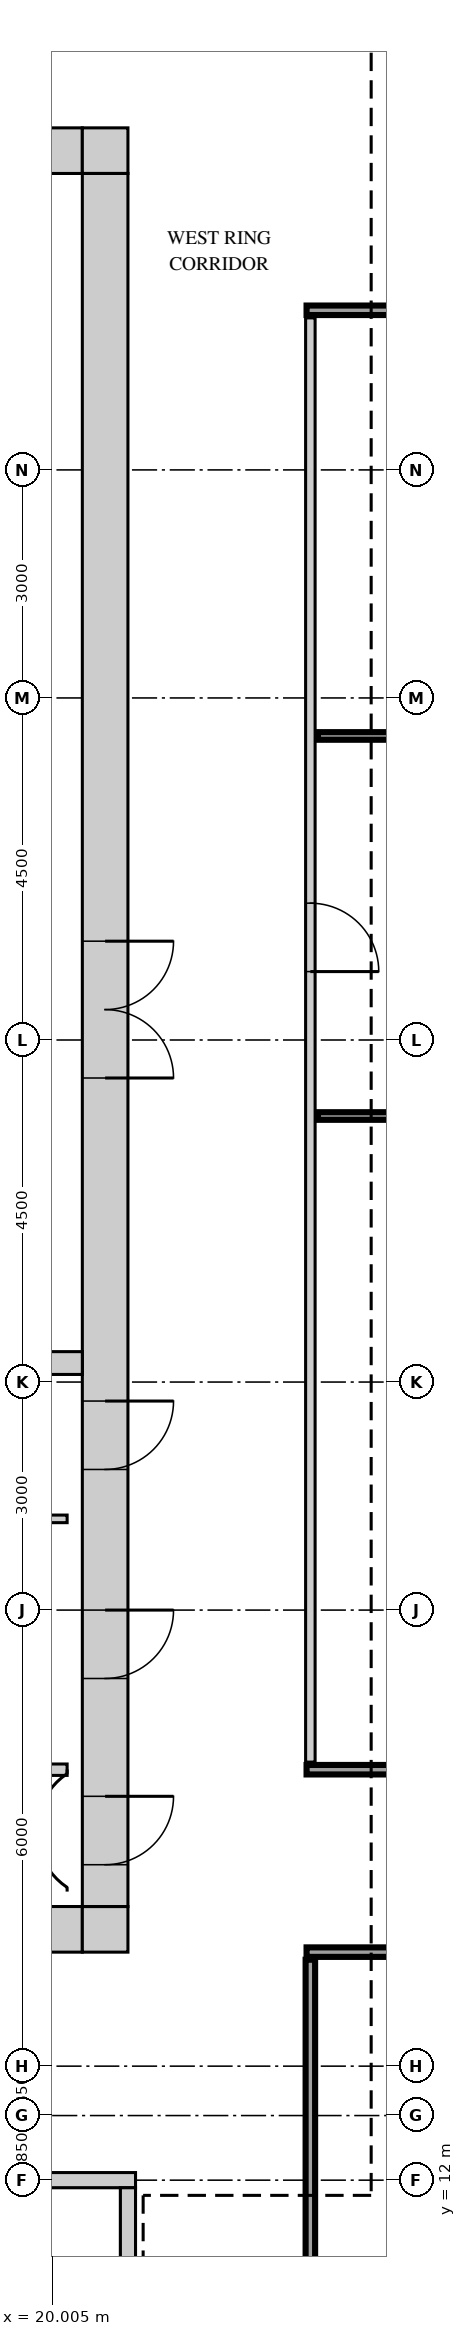
"""IFC4 building model, lengths in metres.
Left out: names, types, materials, properties, quantities, classifications, styles, units other than length and angle.
Written with IfcOpenShell. Run it as: python <this file> out.ifc"""

import sys

from ifc_helpers import new_model, si_unit, direction, frame, frame_2d, origin, place, context, subcontext, project, spatial, rectangle, extrude, source, transform, mapped, element, fill, save


model = new_model("IFC4")
c1 = context("Model", 3, precision=1e-05, world=origin(), true_north=direction((0.0, 1.0)))
c2 = subcontext(c1, "Body", "Model", "MODEL_VIEW")
j1 = project(units=[si_unit("LENGTHUNIT", "METRE"), si_unit("PLANEANGLEUNIT", "RADIAN")], contexts=[c1])
p1 = place(None, origin())
s1 = spatial("IfcSite", under=j1, at=p1, CompositionType="ELEMENT")
p2 = place(p1, origin())
s2 = spatial("IfcBuilding", under=s1, at=p2, CompositionType="ELEMENT")
p3 = place(p2, frame((0.0, 0.0, 306.2)))
s3 = spatial("IfcBuildingStorey", under=s2, at=p3, CompositionType="ELEMENT", Elevation=306.2)
m1 = source(origin(), c2, "Body", "SweptSolid", [
    extrude(rectangle(XDim=14.4, YDim=0.6, at=frame_2d((7.2, 0.0))), origin(), (0.0, 0.0, 1.0), 3.75),
])
p4 = place(p3, frame((6.0, 38.7, 0.0), z_axis=(0.0, 0.0, 1.0), x_axis=(1.0, 0.0, 0.0)))
e1 = element("IfcWall", 1, at=p4, inside=s3, PredefinedType="SHEAR", context=c2, shape_type="MappedRepresentation", body=[
    mapped(m1, transform((0.0, 0.0, 0.0))),
])
m2 = source(origin(), c2, "Body", "SweptSolid", [
    extrude(rectangle(XDim=0.9, YDim=2.1, at=frame_2d((0.45, 1.05))), frame((0.0, 0.31, 0.0), z_axis=(0.0, -1.0, 0.0), x_axis=(1.0, 0.0, 0.0)), (0.0, 0.0, 1.0), 0.62),
])
p5 = place(p4, frame((3.7, 0.0, 0.0)))
e2 = element("IfcOpeningElement", 2, at=p5, cuts=e1, PredefinedType="OPENING", context=c2, shape_type="MappedRepresentation", body=[
    mapped(m2, transform((0.0, 0.0, 0.0))),
])
p6 = place(p4, frame((10.4, 0.0, 0.0)))
e3 = element("IfcOpeningElement", 3, at=p6, cuts=e1, PredefinedType="OPENING", context=c2, shape_type="MappedRepresentation", body=[
    mapped(m2, transform((0.0, 0.0, 0.0))),
])
m3 = source(origin(), c2, "Body", "SweptSolid", [
    extrude(rectangle(XDim=0.6, YDim=0.6, at=frame_2d((0.3, 0.0))), origin(), (0.0, 0.0, 1.0), 3.75),
])
p7 = place(p3, frame((20.4, 38.7, 0.0), z_axis=(0.0, 0.0, 1.0), x_axis=(1.0, 0.0, 0.0)))
e4 = element("IfcWall", 4, at=p7, inside=s3, PredefinedType="SHEAR", context=c2, shape_type="MappedRepresentation", body=[
    mapped(m3, transform((0.0, 0.0, 0.0))),
])
p8 = place(p3, frame((6.0, 15.3, 0.0), z_axis=(0.0, 0.0, 1.0), x_axis=(1.0, 0.0, 0.0)))
e5 = element("IfcWall", 5, at=p8, inside=s3, PredefinedType="SHEAR", context=c2, shape_type="MappedRepresentation", body=[
    mapped(m1, transform((0.0, 0.0, 0.0))),
])
m4 = source(origin(), c2, "Body", "SweptSolid", [
    extrude(rectangle(XDim=1.2, YDim=2.1, at=frame_2d((0.6, 1.05))), frame((0.0, 0.31, 0.0), z_axis=(0.0, -1.0, 0.0), x_axis=(1.0, 0.0, 0.0)), (0.0, 0.0, 1.0), 0.62),
])
p9 = place(p8, frame((6.2, 0.0, 0.0)))
e6 = element("IfcOpeningElement", 6, at=p9, cuts=e5, PredefinedType="OPENING", context=c2, shape_type="MappedRepresentation", body=[
    mapped(m4, transform((0.0, 0.0, 0.0))),
])
p10 = place(p8, frame((2.85, 0.0, 0.0)))
e7 = element("IfcOpeningElement", 7, at=p10, cuts=e5, PredefinedType="OPENING", context=c2, shape_type="MappedRepresentation", body=[
    mapped(m4, transform((0.0, 0.0, 0.0))),
])
m5 = source(origin(), c2, "Body", "SweptSolid", [
    extrude(rectangle(XDim=1.0, YDim=2.1, at=frame_2d((0.5, 1.05))), frame((0.0, 0.31, 0.0), z_axis=(0.0, -1.0, 0.0), x_axis=(1.0, 0.0, 0.0)), (0.0, 0.0, 1.0), 0.62),
])
p11 = place(p8, frame((8.7, 0.0, 0.0)))
e8 = element("IfcOpeningElement", 8, at=p11, cuts=e5, PredefinedType="OPENING", context=c2, shape_type="MappedRepresentation", body=[
    mapped(m5, transform((0.0, 0.0, 0.0))),
])
p12 = place(p3, frame((20.4, 15.3, 0.0), z_axis=(0.0, 0.0, 1.0), x_axis=(1.0, 0.0, 0.0)))
e9 = element("IfcWall", 9, at=p12, inside=s3, PredefinedType="SHEAR", context=c2, shape_type="MappedRepresentation", body=[
    mapped(m3, transform((0.0, 0.0, 0.0))),
])
m6 = source(origin(), c2, "Body", "SweptSolid", [
    extrude(rectangle(XDim=22.8, YDim=0.6, at=frame_2d((11.4, 0.0))), origin(), (0.0, 0.0, 1.0), 3.75),
])
p13 = place(p3, frame((20.7, 15.6, 0.0), z_axis=(0.0, 0.0, 1.0), x_axis=(0.0, 1.0, 0.0)))
e10 = element("IfcWall", 10, at=p13, inside=s3, PredefinedType="SHEAR", context=c2, shape_type="MappedRepresentation", body=[
    mapped(m6, transform((0.0, 0.0, 0.0))),
])
m7 = source(origin(), c2, "Body", "SweptSolid", [
    extrude(rectangle(XDim=1.8, YDim=2.1, at=frame_2d((0.9, 1.05))), frame((0.0, 0.31, 0.0), z_axis=(0.0, -1.0, 0.0), x_axis=(1.0, 0.0, 0.0)), (0.0, 0.0, 1.0), 0.62),
])
p14 = place(p13, frame((10.9, 0.0, 0.0)))
e11 = element("IfcOpeningElement", 11, at=p14, cuts=e10, PredefinedType="OPENING", context=c2, shape_type="MappedRepresentation", body=[
    mapped(m7, transform((0.0, 0.0, 0.0))),
])
p15 = place(p13, frame((0.55, 0.0, 0.0)))
e12 = element("IfcOpeningElement", 12, at=p15, cuts=e10, PredefinedType="OPENING", context=c2, shape_type="MappedRepresentation", body=[
    mapped(m2, transform((0.0, 0.0, 0.0))),
])
p16 = place(p13, frame((3.0, 0.0, 0.0)))
e13 = element("IfcOpeningElement", 13, at=p16, cuts=e10, PredefinedType="OPENING", context=c2, shape_type="MappedRepresentation", body=[
    mapped(m2, transform((0.0, 0.0, 0.0))),
])
p17 = place(p13, frame((5.75, 0.0, 0.0)))
e14 = element("IfcOpeningElement", 14, at=p17, cuts=e10, PredefinedType="OPENING", context=c2, shape_type="MappedRepresentation", body=[
    mapped(m2, transform((0.0, 0.0, 0.0))),
])
m8 = source(origin(), c2, "Body", "SweptSolid", [
    extrude(rectangle(XDim=7.2, YDim=0.2, at=frame_2d((3.6, 0.0))), origin(), (0.0, 0.0, 1.0), 3.75),
])
p18 = place(p3, frame((13.9, 12.0, 0.0), z_axis=(0.0, 0.0, 1.0), x_axis=(1.0, 0.0, 0.0)))
e15 = element("IfcWall", 15, at=p18, inside=s3, PredefinedType="SHEAR", context=c2, shape_type="MappedRepresentation", body=[
    mapped(m8, transform((0.0, 0.0, 0.0))),
])
m9 = source(origin(), c2, "Body", "SweptSolid", [
    extrude(rectangle(XDim=3.35, YDim=0.2, at=frame_2d((1.675, 0.0))), origin(), (0.0, 0.0, 1.0), 3.75),
])
p19 = place(p3, frame((21.0, 8.55, 0.0), z_axis=(0.0, 0.0, 1.0), x_axis=(0.0, 1.0, 0.0)))
e16 = element("IfcWall", 16, at=p19, inside=s3, PredefinedType="SHEAR", context=c2, shape_type="MappedRepresentation", body=[
    mapped(m9, transform((0.0, 0.0, 0.0))),
])
m10 = source(origin(), c2, "Body", "SweptSolid", [
    extrude(rectangle(XDim=13.2, YDim=0.3, at=frame_2d((6.6, 0.0))), origin(), (0.0, 0.0, 1.0), 3.75),
])
p20 = place(p3, frame((7.2, 22.75, 0.0), z_axis=(0.0, 0.0, 1.0), x_axis=(1.0, 0.0, 0.0)))
e17 = element("IfcWall", 17, at=p20, inside=s3, PredefinedType="STANDARD", context=c2, shape_type="MappedRepresentation", body=[
    mapped(m10, transform((0.0, 0.0, 0.0))),
])
m11 = source(origin(), c2, "Body", "SweptSolid", [
    extrude(rectangle(XDim=8.75, YDim=0.125, at=frame_2d((4.375, 0.0))), origin(), (0.0, 0.0, 1.0), 3.8),
])
p21 = place(p3, frame((23.4, 6.15, 0.0), z_axis=(0.0, 0.0, 1.0), x_axis=(0.0, 1.0, 0.0)))
e18 = element("IfcWall", 18, at=p21, inside=s3, PredefinedType="PARTITIONING", context=c2, shape_type="MappedRepresentation", body=[
    mapped(m11, transform((0.0, 0.0, 0.0))),
])
m12 = source(origin(), c2, "Body", "SweptSolid", [
    extrude(rectangle(XDim=19.1, YDim=0.125, at=frame_2d((9.55, 0.0))), origin(), (0.0, 0.0, 1.0), 3.8),
])
p22 = place(p3, frame((23.35, 15.0, 0.0), z_axis=(0.0, 0.0, 1.0), x_axis=(1.0, 0.0, 0.0)))
e19 = element("IfcWall", 19, at=p22, inside=s3, PredefinedType="PARTITIONING", context=c2, shape_type="MappedRepresentation", body=[
    mapped(m12, transform((0.0, 0.0, 0.0))),
])
m13 = source(origin(), c2, "Body", "SweptSolid", [
    extrude(rectangle(XDim=1.2, YDim=2.1, at=frame_2d((0.6, 1.05))), frame((0.0, 0.073, 0.0), z_axis=(0.0, -1.0, 0.0), x_axis=(1.0, 0.0, 0.0)), (0.0, 0.0, 1.0), 0.145),
])
p23 = place(p22, frame((7.75, 0.0, 0.0)))
e20 = element("IfcOpeningElement", 20, at=p23, cuts=e19, PredefinedType="OPENING", context=c2, shape_type="MappedRepresentation", body=[
    mapped(m13, transform((0.0, 0.0, 0.0))),
])
m14 = source(origin(), c2, "Body", "SweptSolid", [
    extrude(rectangle(XDim=4.0, YDim=0.15, at=frame_2d((2.0, 0.0))), origin(), (0.0, 0.0, 1.0), 3.8),
])
p24 = place(p3, frame((16.2, 17.4, 0.0), z_axis=(0.0, 0.0, 1.0), x_axis=(1.0, 0.0, 0.0)))
e21 = element("IfcWall", 21, at=p24, inside=s3, PredefinedType="PARTITIONING", context=c2, shape_type="MappedRepresentation", body=[
    mapped(m14, transform((0.0, 0.0, 0.0))),
])
m15 = source(origin(), c2, "Body", "SweptSolid", [
    extrude(rectangle(XDim=16.7, YDim=0.125, at=frame_2d((8.35, 0.0))), origin(), (0.0, 0.0, 1.0), 3.8),
])
p25 = place(p3, frame((23.35, 17.4, 0.0), z_axis=(0.0, 0.0, 1.0), x_axis=(1.0, 0.0, 0.0)))
e22 = element("IfcWall", 22, at=p25, inside=s3, PredefinedType="PARTITIONING", context=c2, shape_type="MappedRepresentation", body=[
    mapped(m15, transform((0.0, 0.0, 0.0))),
])
p26 = place(p25, frame((7.75, 0.0, 0.0)))
e23 = element("IfcOpeningElement", 23, at=p26, cuts=e22, PredefinedType="OPENING", context=c2, shape_type="MappedRepresentation", body=[
    mapped(m13, transform((0.0, 0.0, 0.0))),
])
m16 = source(origin(), c2, "Body", "SweptSolid", [
    extrude(rectangle(XDim=19.0, YDim=0.125, at=frame_2d((9.5, 0.0))), origin(), (0.0, 0.0, 1.0), 3.8),
])
p27 = place(p3, frame((23.4, 17.5, 0.0), z_axis=(0.0, 0.0, 1.0), x_axis=(0.0, 1.0, 0.0)))
e24 = element("IfcWall", 24, at=p27, inside=s3, PredefinedType="PARTITIONING", context=c2, shape_type="MappedRepresentation", body=[
    mapped(m16, transform((0.0, 0.0, 0.0))),
])
m17 = source(origin(), c2, "Body", "SweptSolid", [
    extrude(rectangle(XDim=0.9, YDim=2.1, at=frame_2d((0.45, 1.05))), frame((0.0, 0.073, 0.0), z_axis=(0.0, -1.0, 0.0), x_axis=(1.0, 0.0, 0.0)), (0.0, 0.0, 1.0), 0.145),
])
p28 = place(p27, frame((10.4, 0.0, 0.0)))
e25 = element("IfcOpeningElement", 25, at=p28, cuts=e24, PredefinedType="OPENING", context=c2, shape_type="MappedRepresentation", body=[
    mapped(m17, transform((0.0, 0.0, 0.0))),
])
m18 = source(origin(), c2, "Body", "SweptSolid", [
    extrude(rectangle(XDim=4.1, YDim=0.1, at=frame_2d((2.05, 0.0))), origin(), (0.0, 0.0, 1.0), 3.8),
])
p29 = place(p3, frame((16.1, 20.7, 0.0), z_axis=(0.0, 0.0, 1.0), x_axis=(1.0, 0.0, 0.0)))
e26 = element("IfcWall", 26, at=p29, inside=s3, PredefinedType="PARTITIONING", context=c2, shape_type="MappedRepresentation", body=[
    mapped(m18, transform((0.0, 0.0, 0.0))),
])
m19 = source(origin(), c2, "Body", "SweptSolid", [
    extrude(rectangle(XDim=16.4, YDim=0.1, at=frame_2d((8.2, 0.0))), origin(), (0.0, 0.0, 1.0), 3.8),
])
for number, where, z_axis, x_axis in (
    (27, (23.5, 26.0, 0.0), (0.0, 0.0, 1.0), (1.0, 0.0, 0.0)),
    (28, (23.5, 31.0, 0.0), (0.0, 0.0, 1.0), (1.0, 0.0, 0.0)),
):
    element("IfcWall", number, at=place(p3, frame(where, z_axis=z_axis, x_axis=x_axis)), inside=s3, PredefinedType="PARTITIONING", context=c2, shape_type="MappedRepresentation", body=[
        mapped(m19, transform((0.0, 0.0, 0.0))),
    ])
p30 = place(p3, frame((23.35, 36.6, 0.0), z_axis=(0.0, 0.0, 1.0), x_axis=(1.0, 0.0, 0.0)))
e29 = element("IfcWall", 29, at=p30, inside=s3, PredefinedType="PARTITIONING", context=c2, shape_type="MappedRepresentation", body=[
    mapped(m15, transform((0.0, 0.0, 0.0))),
])
p31 = place(p30, frame((8.05, 0.0, 0.0)))
e30 = element("IfcOpeningElement", 30, at=p31, cuts=e29, PredefinedType="OPENING", context=c2, shape_type="MappedRepresentation", body=[
    mapped(m17, transform((0.0, 0.0, 0.0))),
])
m20 = source(origin(), c2, "Body", "SweptSolid", [
    extrude(rectangle(XDim=1.8, YDim=2.1, at=frame_2d((0.9, 1.05))), frame((0.0, 0.25, 0.0), z_axis=(0.0, -1.0, 0.0), x_axis=(1.0, 0.0, 0.0)), (0.0, 0.0, 1.0), 0.5),
])
p32 = place(p14, origin())
e31 = element("IfcDoor", 31, at=p32, inside=s3, OperationType="DOUBLE_DOOR_SINGLE_SWING", PredefinedType="DOOR", context=c2, shape_type="MappedRepresentation", body=[
    mapped(m20, transform((0.0, 0.0, 0.0))),
])
fill(e11, e31)
m21 = source(origin(), c2, "Body", "SweptSolid", [
    extrude(rectangle(XDim=0.9, YDim=2.1, at=frame_2d((0.45, 1.05))), frame((0.0, 0.25, 0.0), z_axis=(0.0, -1.0, 0.0), x_axis=(1.0, 0.0, 0.0)), (0.0, 0.0, 1.0), 0.5),
])
p33 = place(p15, origin())
e32 = element("IfcDoor", 32, at=p33, inside=s3, OperationType="SINGLE_SWING_RIGHT", PredefinedType="DOOR", context=c2, shape_type="MappedRepresentation", body=[
    mapped(m21, transform((0.0, 0.0, 0.0))),
])
fill(e12, e32)
p34 = place(p16, origin())
e33 = element("IfcDoor", 33, at=p34, inside=s3, OperationType="SINGLE_SWING_RIGHT", PredefinedType="DOOR", context=c2, shape_type="MappedRepresentation", body=[
    mapped(m21, transform((0.0, 0.0, 0.0))),
])
fill(e13, e33)
p35 = place(p17, origin())
e34 = element("IfcDoor", 34, at=p35, inside=s3, OperationType="SINGLE_SWING_RIGHT", PredefinedType="DOOR", context=c2, shape_type="MappedRepresentation", body=[
    mapped(m21, transform((0.0, 0.0, 0.0))),
])
fill(e14, e34)
m22 = source(origin(), c2, "Body", "SweptSolid", [
    extrude(rectangle(XDim=0.9, YDim=2.1, at=frame_2d((0.45, 1.05))), frame((0.0, 0.025, 0.0), z_axis=(0.0, -1.0, 0.0), x_axis=(1.0, 0.0, 0.0)), (0.0, 0.0, 1.0), 0.05),
])
p36 = place(p28, origin())
e35 = element("IfcDoor", 35, at=p36, inside=s3, OperationType="SINGLE_SWING_LEFT", PredefinedType="DOOR", context=c2, shape_type="MappedRepresentation", body=[
    mapped(m22, transform((0.0, 0.0, 0.0))),
])
fill(e25, e35)
save(model, sys.argv[1])
